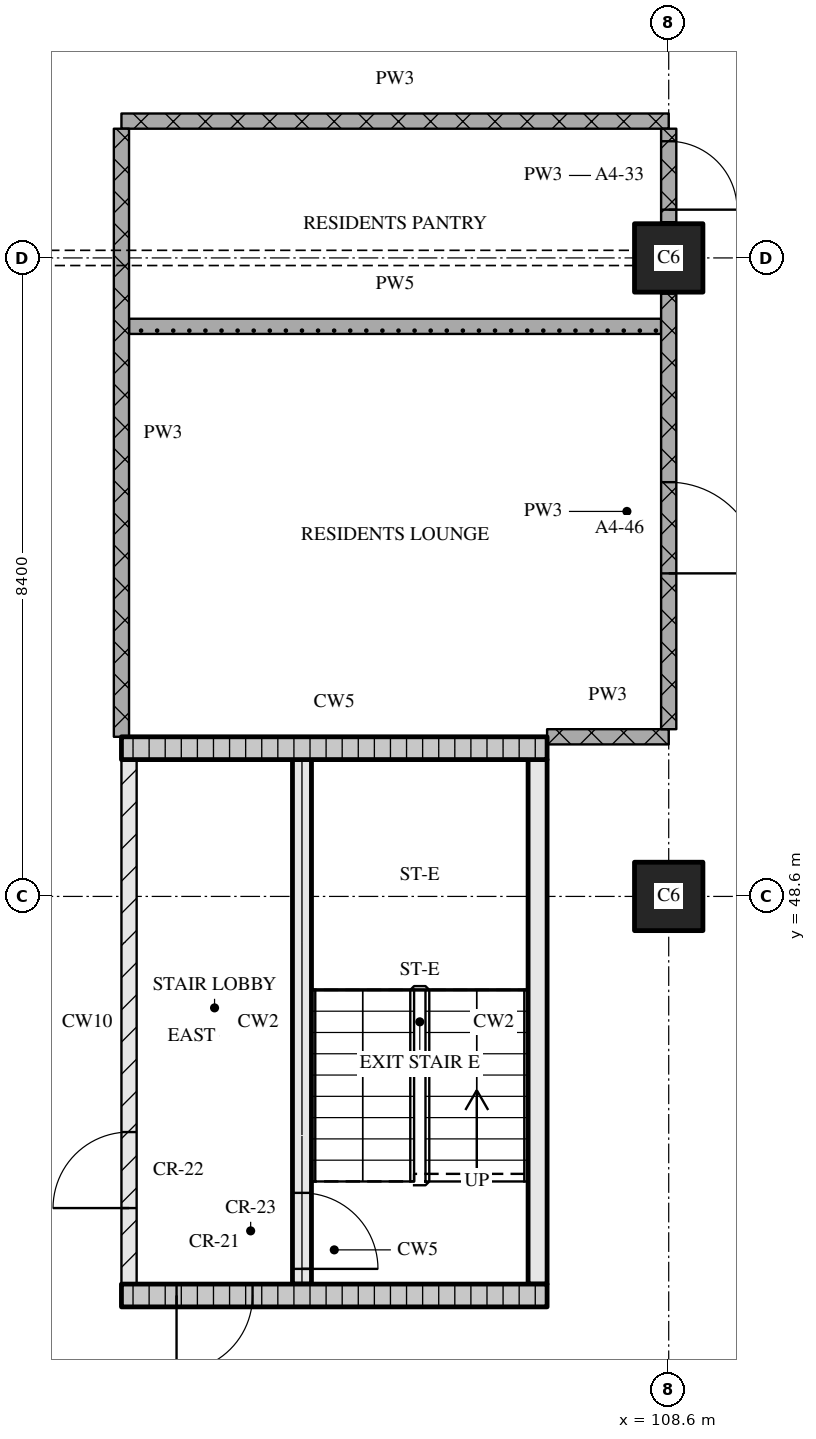
"""IFC4 building model, lengths in metres.
Left out: names, types, materials, properties, quantities, classifications, styles, units other than length and angle.
Written with IfcOpenShell. Run it as: python <this file> out.ifc"""

import sys

from ifc_helpers import new_model, si_unit, direction, frame, frame_2d, origin, origin_2d, place, context, subcontext, project, spatial, rectangle, extrude, element, fill, save


model = new_model("IFC4")
c1 = context("Model", 3, precision=1e-05, world=origin(), true_north=direction((0.0, 1.0)))
c2 = subcontext(c1, "Body", "Model", "MODEL_VIEW")
j1 = project(units=[si_unit("LENGTHUNIT", "METRE"), si_unit("PLANEANGLEUNIT", "RADIAN")], contexts=[c1])
p1 = place(None, origin())
s1 = spatial("IfcSite", under=j1, at=p1, CompositionType="ELEMENT")
p2 = place(p1, origin())
s2 = spatial("IfcBuilding", under=s1, at=p2, CompositionType="ELEMENT")
p3 = place(p2, frame((0.0, 0.0, 73.2)))
s3 = spatial("IfcBuildingStorey", under=s2, at=p3, CompositionType="ELEMENT", Elevation=73.2)
for number, where, z_axis, x_axis in (
    (1, (108.6, 48.6, 0.0), (0.0, 0.0, 1.0), (1.0, 0.0, 0.0)),
    (2, (108.6, 57.0, 0.0), (0.0, 0.0, 1.0), (1.0, 0.0, 0.0)),
):
    element("IfcColumn", number, at=place(p3, frame(where, z_axis=z_axis, x_axis=x_axis)), inside=s3, PredefinedType="COLUMN", context=c2, shape_type="SweptSolid", body=[
        extrude(rectangle(XDim=0.9, YDim=0.9, at=origin_2d()), origin(), (0.0, 0.0, 1.0), 3.6),
    ])
p4 = place(p3, frame((101.4, 43.35, 0.0), z_axis=(0.0, 0.0, 1.0), x_axis=(1.0, 0.0, 0.0)))
e3 = element("IfcWall", 3, at=p4, inside=s3, PredefinedType="SOLIDWALL", context=c2, shape_type="SweptSolid", body=[
    extrude(rectangle(XDim=5.6, YDim=0.3, at=frame_2d((2.8, 0.0))), origin(), (0.0, 0.0, 1.0), 3.32),
])
p5 = place(p4, frame((0.725, 0.0, 0.0)))
e4 = element("IfcOpeningElement", 4, at=p5, cuts=e3, PredefinedType="OPENING", context=c2, shape_type="SweptSolid", body=[
    extrude(rectangle(XDim=1.0, YDim=2.1, at=frame_2d((0.5, 1.05))), frame((0.0, 0.16, 0.0), z_axis=(0.0, -1.0, 0.0), x_axis=(1.0, 0.0, 0.0)), (0.0, 0.0, 1.0), 0.32),
])
p6 = place(p3, frame((101.5, 43.5, 0.0), z_axis=(0.0, 0.0, 1.0), x_axis=(0.0, 1.0, 0.0)))
e5 = element("IfcWall", 5, at=p6, inside=s3, PredefinedType="PARTITIONING", context=c2, shape_type="SweptSolid", body=[
    extrude(rectangle(XDim=6.9, YDim=0.2, at=frame_2d((3.45, 0.0))), origin(), (0.0, 0.0, 1.0), 3.32),
])
p7 = place(p6, frame((1.0, 0.0, 0.0)))
e6 = element("IfcOpeningElement", 6, at=p7, cuts=e5, PredefinedType="OPENING", context=c2, shape_type="SweptSolid", body=[
    extrude(rectangle(XDim=1.0, YDim=2.1, at=frame_2d((0.5, 1.05))), frame((0.0, 0.11, 0.0), z_axis=(0.0, -1.0, 0.0), x_axis=(1.0, 0.0, 0.0)), (0.0, 0.0, 1.0), 0.22),
])
p8 = place(p3, frame((103.775, 43.5, 0.0), z_axis=(0.0, 0.0, 1.0), x_axis=(0.0, 1.0, 0.0)))
e7 = element("IfcWall", 7, at=p8, inside=s3, PredefinedType="SOLIDWALL", context=c2, shape_type="SweptSolid", body=[
    extrude(rectangle(XDim=6.9, YDim=0.25, at=frame_2d((3.45, 0.0))), origin(), (0.0, 0.0, 1.0), 3.32),
])
p9 = place(p8, frame((0.2, 0.0, 0.0)))
e8 = element("IfcOpeningElement", 8, at=p9, cuts=e7, PredefinedType="OPENING", context=c2, shape_type="SweptSolid", body=[
    extrude(rectangle(XDim=1.0, YDim=2.1, at=frame_2d((0.5, 1.05))), frame((0.0, 0.135, 0.0), z_axis=(0.0, -1.0, 0.0), x_axis=(1.0, 0.0, 0.0)), (0.0, 0.0, 1.0), 0.27),
])
p10 = place(p3, frame((106.875, 43.5, 0.0), z_axis=(0.0, 0.0, 1.0), x_axis=(0.0, 1.0, 0.0)))
e9 = element("IfcWall", 9, at=p10, inside=s3, PredefinedType="SOLIDWALL", context=c2, shape_type="SweptSolid", body=[
    extrude(rectangle(XDim=6.9, YDim=0.25, at=frame_2d((3.45, 0.0))), origin(), (0.0, 0.0, 1.0), 3.32),
])
p11 = place(p3, frame((101.4, 50.55, 0.0), z_axis=(0.0, 0.0, 1.0), x_axis=(1.0, 0.0, 0.0)))
e10 = element("IfcWall", 10, at=p11, inside=s3, PredefinedType="SOLIDWALL", context=c2, shape_type="SweptSolid", body=[
    extrude(rectangle(XDim=5.6, YDim=0.3, at=frame_2d((2.8, 0.0))), origin(), (0.0, 0.0, 1.0), 3.32),
])
p12 = place(p3, frame((107.0, 50.7, 0.0), z_axis=(0.0, 0.0, 1.0), x_axis=(1.0, 0.0, 0.0)))
e11 = element("IfcWall", 11, at=p12, inside=s3, PredefinedType="PARTITIONING", context=c2, shape_type="SweptSolid", body=[
    extrude(rectangle(XDim=1.6, YDim=0.2, at=frame_2d((0.8, 0.0))), origin(), (0.0, 0.0, 1.0), 3.32),
])
p13 = place(p3, frame((101.5, 56.1, 0.0), z_axis=(0.0, 0.0, 1.0), x_axis=(1.0, 0.0, 0.0)))
e12 = element("IfcWall", 12, at=p13, inside=s3, PredefinedType="PARTITIONING", context=c2, shape_type="SweptSolid", body=[
    extrude(rectangle(XDim=7.0, YDim=0.2, at=frame_2d((3.5, 0.0))), origin(), (0.0, 0.0, 1.0), 3.32),
])
p14 = place(p3, frame((101.4, 58.8, 0.0), z_axis=(0.0, 0.0, 1.0), x_axis=(1.0, 0.0, 0.0)))
e13 = element("IfcWall", 13, at=p14, inside=s3, PredefinedType="PARTITIONING", context=c2, shape_type="SweptSolid", body=[
    extrude(rectangle(XDim=7.2, YDim=0.2, at=frame_2d((3.6, 0.0))), origin(), (0.0, 0.0, 1.0), 3.32),
])
p15 = place(p3, frame((101.4, 58.7, 0.0), z_axis=(0.0, 0.0, 1.0), x_axis=(0.0, -1.0, 0.0)))
e14 = element("IfcWall", 14, at=p15, inside=s3, PredefinedType="PARTITIONING", context=c2, shape_type="SweptSolid", body=[
    extrude(rectangle(XDim=8.0, YDim=0.2, at=frame_2d((4.0, 0.0))), origin(), (0.0, 0.0, 1.0), 3.32),
])
p16 = place(p3, frame((108.6, 50.8, 0.0), z_axis=(0.0, 0.0, 1.0), x_axis=(0.0, 1.0, 0.0)))
e15 = element("IfcWall", 15, at=p16, inside=s3, PredefinedType="PARTITIONING", context=c2, shape_type="SweptSolid", body=[
    extrude(rectangle(XDim=5.73, YDim=0.2, at=frame_2d((2.865, 0.0))), origin(), (0.0, 0.0, 1.0), 3.32),
])
p17 = place(p16, frame((2.05, 0.0, 0.0)))
e16 = element("IfcOpeningElement", 16, at=p17, cuts=e15, PredefinedType="OPENING", context=c2, shape_type="SweptSolid", body=[
    extrude(rectangle(XDim=1.2, YDim=2.1, at=frame_2d((0.6, 1.05))), frame((0.0, 0.11, 0.0), z_axis=(0.0, -1.0, 0.0), x_axis=(1.0, 0.0, 0.0)), (0.0, 0.0, 1.0), 0.22),
])
p18 = place(p3, frame((108.6, 57.47, 0.0), z_axis=(0.0, 0.0, 1.0), x_axis=(0.0, 1.0, 0.0)))
e17 = element("IfcWall", 17, at=p18, inside=s3, PredefinedType="PARTITIONING", context=c2, shape_type="SweptSolid", body=[
    extrude(rectangle(XDim=1.23, YDim=0.2, at=frame_2d((0.615, 0.0))), origin(), (0.0, 0.0, 1.0), 3.32),
])
p19 = place(p18, frame((0.165, 0.0, 0.0)))
e18 = element("IfcOpeningElement", 18, at=p19, cuts=e17, PredefinedType="OPENING", context=c2, shape_type="SweptSolid", body=[
    extrude(rectangle(XDim=0.9, YDim=2.1, at=frame_2d((0.45, 1.05))), frame((0.0, 0.11, 0.0), z_axis=(0.0, -1.0, 0.0), x_axis=(1.0, 0.0, 0.0)), (0.0, 0.0, 1.0), 0.22),
])
p20 = place(p5, origin())
e19 = element("IfcDoor", 19, at=p20, inside=s3, OperationType="SINGLE_SWING_RIGHT", PredefinedType="DOOR", context=c2, shape_type="SweptSolid", body=[
    extrude(rectangle(XDim=1.0, YDim=2.1, at=frame_2d((0.5, 1.05))), frame((0.0, 0.025, 0.0), z_axis=(0.0, -1.0, 0.0), x_axis=(1.0, 0.0, 0.0)), (0.0, 0.0, 1.0), 0.05),
])
fill(e4, e19)
p21 = place(p9, origin())
e20 = element("IfcDoor", 20, at=p21, inside=s3, OperationType="SINGLE_SWING_RIGHT", PredefinedType="DOOR", context=c2, shape_type="SweptSolid", body=[
    extrude(rectangle(XDim=1.0, YDim=2.1, at=frame_2d((0.5, 1.05))), frame((0.0, 0.025, 0.0), z_axis=(0.0, -1.0, 0.0), x_axis=(1.0, 0.0, 0.0)), (0.0, 0.0, 1.0), 0.05),
])
fill(e8, e20)
p22 = place(p7, origin())
e21 = element("IfcDoor", 21, at=p22, inside=s3, OperationType="SINGLE_SWING_LEFT", PredefinedType="DOOR", context=c2, shape_type="SweptSolid", body=[
    extrude(rectangle(XDim=1.0, YDim=2.1, at=frame_2d((0.5, 1.05))), frame((0.0, 0.025, 0.0), z_axis=(0.0, -1.0, 0.0), x_axis=(1.0, 0.0, 0.0)), (0.0, 0.0, 1.0), 0.05),
])
fill(e6, e21)
p23 = place(p17, origin())
e22 = element("IfcDoor", 22, at=p23, inside=s3, OperationType="SINGLE_SWING_RIGHT", PredefinedType="DOOR", context=c2, shape_type="SweptSolid", body=[
    extrude(rectangle(XDim=1.2, YDim=2.1, at=frame_2d((0.6, 1.05))), frame((0.0, 0.025, 0.0), z_axis=(0.0, -1.0, 0.0), x_axis=(1.0, 0.0, 0.0)), (0.0, 0.0, 1.0), 0.05),
])
fill(e16, e22)
p24 = place(p19, origin())
e23 = element("IfcDoor", 23, at=p24, inside=s3, OperationType="SINGLE_SWING_RIGHT", PredefinedType="DOOR", context=c2, shape_type="SweptSolid", body=[
    extrude(rectangle(XDim=0.9, YDim=2.1, at=frame_2d((0.45, 1.05))), frame((0.0, 0.025, 0.0), z_axis=(0.0, -1.0, 0.0), x_axis=(1.0, 0.0, 0.0)), (0.0, 0.0, 1.0), 0.05),
])
fill(e18, e23)
save(model, sys.argv[1])
